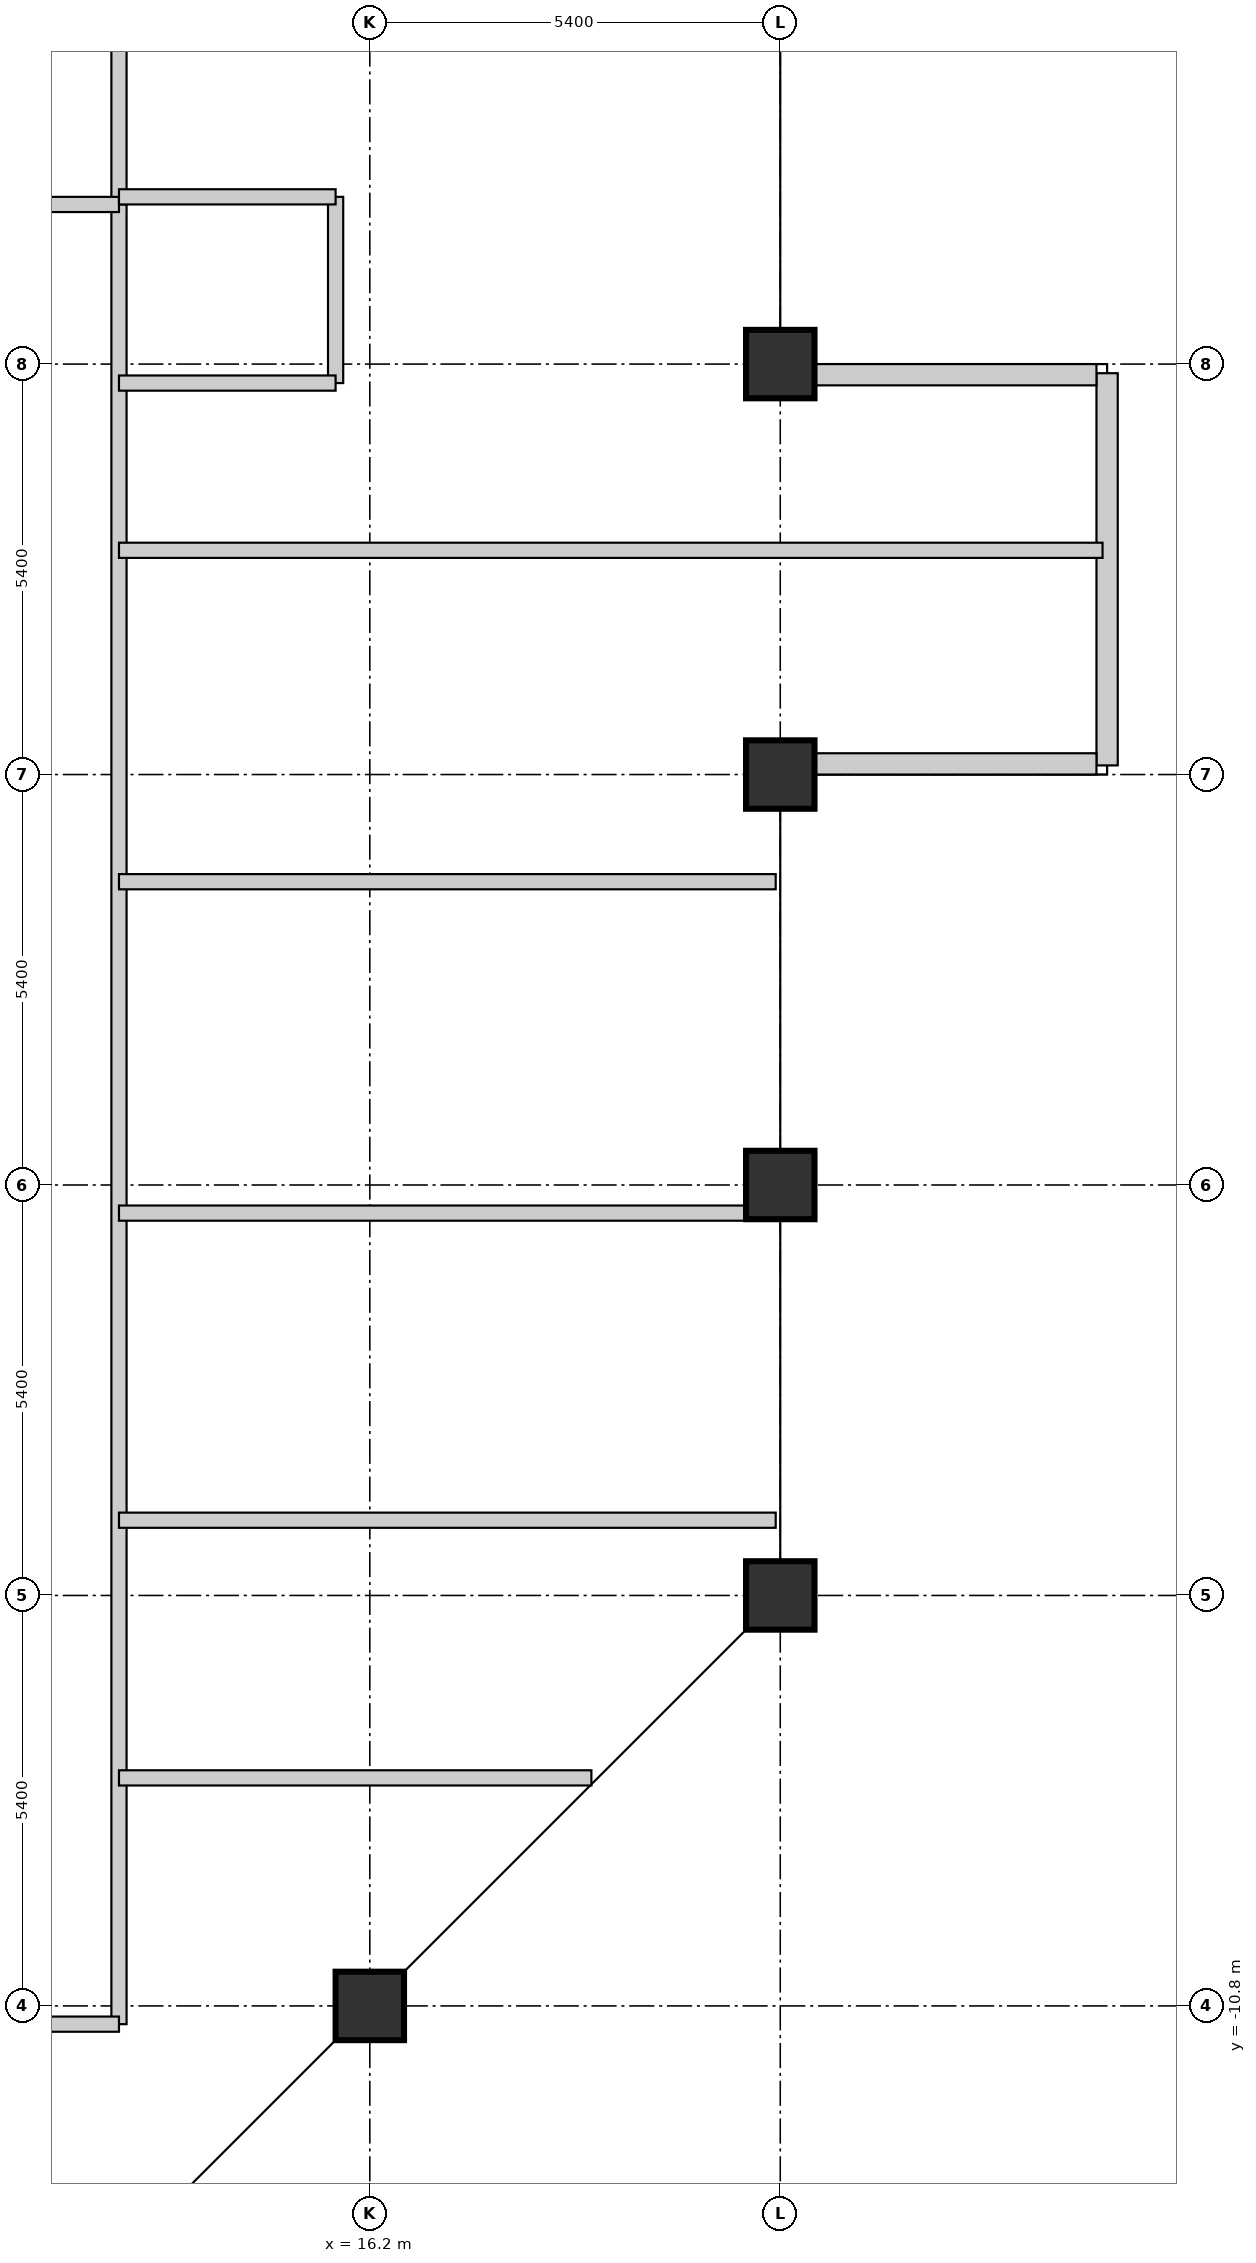
"""IFC4 building model, lengths in metres.
Left out: names, types, materials, properties, quantities, classifications, styles, units other than length and angle.
Written with IfcOpenShell. Run it as: python <this file> out.ifc"""

import sys

from ifc_helpers import new_model, si_unit, direction, frame, frame_2d, origin, origin_2d, place, context, subcontext, project, spatial, rectangle, extrude, element, fill, save


model = new_model("IFC4")
c1 = context("Model", 3, precision=1e-05, world=origin(), true_north=direction((0.0, 1.0)))
c2 = subcontext(c1, "Body", "Model", "MODEL_VIEW")
j1 = project(units=[si_unit("LENGTHUNIT", "METRE"), si_unit("PLANEANGLEUNIT", "RADIAN")], contexts=[c1])
p1 = place(None, origin())
s1 = spatial("IfcSite", under=j1, at=p1, CompositionType="ELEMENT")
p2 = place(p1, origin())
s2 = spatial("IfcBuilding", under=s1, at=p2, CompositionType="ELEMENT")
p3 = place(p2, frame((0.0, 0.0, 174.75)))
s3 = spatial("IfcBuildingStorey", under=s2, at=p3, CompositionType="ELEMENT", Elevation=174.75)
for number, where, z_axis, x_axis in (
    (1, (16.2, -10.8, 0.0), (0.0, 0.0, 1.0), (1.0, 0.0, 0.0)),
    (2, (21.6, -5.4, 0.0), (0.0, 0.0, 1.0), (1.0, 0.0, 0.0)),
    (3, (21.6, 0.0, 0.0), (0.0, 0.0, 1.0), (1.0, 0.0, 0.0)),
    (4, (21.6, 5.4, 0.0), (0.0, 0.0, 1.0), (1.0, 0.0, 0.0)),
    (5, (21.6, 10.8, 0.0), (0.0, 0.0, 1.0), (1.0, 0.0, 0.0)),
):
    element("IfcColumn", number, at=place(p3, frame(where, z_axis=z_axis, x_axis=x_axis)), inside=s3, PredefinedType="COLUMN", context=c2, shape_type="SweptSolid", body=[
        extrude(rectangle(XDim=0.9, YDim=0.9, at=origin_2d()), origin(), (0.0, 0.0, 1.0), 3.75),
    ])
p4 = place(p3, frame((25.9, 5.52, 0.0), z_axis=(0.0, 0.0, 1.0), x_axis=(0.0, 1.0, 0.0)))
e6 = element("IfcWall", 6, at=p4, inside=s3, PredefinedType="STANDARD", context=c2, shape_type="SweptSolid", body=[
    extrude(rectangle(XDim=5.16, YDim=0.28, at=frame_2d((2.58, 0.0))), origin(), (0.0, 0.0, 1.0), 2.857),
])
p5 = place(p4, frame((0.755, 0.0, 0.75)))
e7 = element("IfcOpeningElement", 7, at=p5, cuts=e6, PredefinedType="OPENING", context=c2, shape_type="SweptSolid", body=[
    extrude(rectangle(XDim=1.5, YDim=1.5, at=frame_2d((0.75, 0.75))), frame((0.0, 0.15, 0.0), z_axis=(0.0, -1.0, 0.0), x_axis=(1.0, 0.0, 0.0)), (0.0, 0.0, 1.0), 0.3),
])
p6 = place(p3, frame((22.054, 5.54, 0.0), z_axis=(0.0, 0.0, 1.0), x_axis=(1.0, 0.0, 0.0)))
e8 = element("IfcWall", 8, at=p6, inside=s3, PredefinedType="STANDARD", context=c2, shape_type="SweptSolid", body=[
    extrude(rectangle(XDim=3.706, YDim=0.28, at=frame_2d((1.853, 0.0))), origin(), (0.0, 0.0, 1.0), 2.857),
])
p7 = place(p6, frame((1.328, 0.0, 0.75)))
e9 = element("IfcOpeningElement", 9, at=p7, cuts=e8, PredefinedType="OPENING", context=c2, shape_type="SweptSolid", body=[
    extrude(rectangle(XDim=1.05, YDim=1.5, at=frame_2d((0.525, 0.75))), frame((0.0, 0.15, 0.0), z_axis=(0.0, -1.0, 0.0), x_axis=(1.0, 0.0, 0.0)), (0.0, 0.0, 1.0), 0.3),
])
p8 = place(p3, frame((22.054, 10.66, 0.0), z_axis=(0.0, 0.0, 1.0), x_axis=(1.0, 0.0, 0.0)))
e10 = element("IfcWall", 10, at=p8, inside=s3, PredefinedType="STANDARD", context=c2, shape_type="SweptSolid", body=[
    extrude(rectangle(XDim=3.706, YDim=0.28, at=frame_2d((1.853, 0.0))), origin(), (0.0, 0.0, 1.0), 2.857),
])
p9 = place(p8, frame((1.328, 0.0, 0.75)))
e11 = element("IfcOpeningElement", 11, at=p9, cuts=e10, PredefinedType="OPENING", context=c2, shape_type="SweptSolid", body=[
    extrude(rectangle(XDim=1.05, YDim=1.5, at=frame_2d((0.525, 0.75))), frame((0.0, 0.15, 0.0), z_axis=(0.0, -1.0, 0.0), x_axis=(1.0, 0.0, 0.0)), (0.0, 0.0, 1.0), 0.3),
])
p10 = place(p3, frame((12.9, 12.9, 0.0), z_axis=(0.0, 0.0, 1.0), x_axis=(0.0, 1.0, 0.0)))
e12 = element("IfcWall", 12, at=p10, inside=s3, PredefinedType="PARTITIONING", context=c2, shape_type="SweptSolid", body=[
    extrude(rectangle(XDim=12.94, YDim=0.2, at=frame_2d((6.47, 0.0))), origin(), (0.0, 0.0, 1.0), 2.78),
])
p11 = place(p3, frame((12.9, -11.04, 0.0), z_axis=(0.0, 0.0, 1.0), x_axis=(0.0, 1.0, 0.0)))
e13 = element("IfcWall", 13, at=p11, inside=s3, PredefinedType="PARTITIONING", context=c2, shape_type="SweptSolid", body=[
    extrude(rectangle(XDim=23.94, YDim=0.2, at=frame_2d((11.97, 0.0))), origin(), (0.0, 0.0, 1.0), 3.006),
])
p12 = place(p11, frame((1.14, 0.0, 0.0)))
e14 = element("IfcOpeningElement", 14, at=p12, cuts=e13, PredefinedType="OPENING", context=c2, shape_type="SweptSolid", body=[
    extrude(rectangle(XDim=0.95, YDim=2.1, at=frame_2d((0.475, 1.05))), frame((0.0, 0.11, 0.0), z_axis=(0.0, -1.0, 0.0), x_axis=(1.0, 0.0, 0.0)), (0.0, 0.0, 1.0), 0.22),
])
p13 = place(p11, frame((22.345, 0.0, 0.0)))
e15 = element("IfcOpeningElement", 15, at=p13, cuts=e13, PredefinedType="OPENING", context=c2, shape_type="SweptSolid", body=[
    extrude(rectangle(XDim=0.85, YDim=2.1, at=frame_2d((0.425, 1.05))), frame((0.0, 0.11, 0.0), z_axis=(0.0, -1.0, 0.0), x_axis=(1.0, 0.0, 0.0)), (0.0, 0.0, 1.0), 0.22),
])
p14 = place(p11, frame((20.01, 0.0, 0.0)))
e16 = element("IfcOpeningElement", 16, at=p14, cuts=e13, PredefinedType="OPENING", context=c2, shape_type="SweptSolid", body=[
    extrude(rectangle(XDim=0.95, YDim=2.1, at=frame_2d((0.475, 1.05))), frame((0.0, 0.11, 0.0), z_axis=(0.0, -1.0, 0.0), x_axis=(1.0, 0.0, 0.0)), (0.0, 0.0, 1.0), 0.22),
])
p15 = place(p11, frame((4.455, 0.0, 0.0)))
e17 = element("IfcOpeningElement", 17, at=p15, cuts=e13, PredefinedType="OPENING", context=c2, shape_type="SweptSolid", body=[
    extrude(rectangle(XDim=0.95, YDim=2.1, at=frame_2d((0.475, 1.05))), frame((0.0, 0.11, 0.0), z_axis=(0.0, -1.0, 0.0), x_axis=(1.0, 0.0, 0.0)), (0.0, 0.0, 1.0), 0.22),
])
p16 = place(p11, frame((8.17, 0.0, 0.0)))
e18 = element("IfcOpeningElement", 18, at=p16, cuts=e13, PredefinedType="OPENING", context=c2, shape_type="SweptSolid", body=[
    extrude(rectangle(XDim=0.95, YDim=2.1, at=frame_2d((0.475, 1.05))), frame((0.0, 0.11, 0.0), z_axis=(0.0, -1.0, 0.0), x_axis=(1.0, 0.0, 0.0)), (0.0, 0.0, 1.0), 0.22),
])
p17 = place(p11, frame((12.37, 0.0, 0.0)))
e19 = element("IfcOpeningElement", 19, at=p17, cuts=e13, PredefinedType="OPENING", context=c2, shape_type="SweptSolid", body=[
    extrude(rectangle(XDim=0.95, YDim=2.1, at=frame_2d((0.475, 1.05))), frame((0.0, 0.11, 0.0), z_axis=(0.0, -1.0, 0.0), x_axis=(1.0, 0.0, 0.0)), (0.0, 0.0, 1.0), 0.22),
])
p18 = place(p11, frame((16.73, 0.0, 0.0)))
e20 = element("IfcOpeningElement", 20, at=p18, cuts=e13, PredefinedType="OPENING", context=c2, shape_type="SweptSolid", body=[
    extrude(rectangle(XDim=0.95, YDim=2.1, at=frame_2d((0.475, 1.05))), frame((0.0, 0.11, 0.0), z_axis=(0.0, -1.0, 0.0), x_axis=(1.0, 0.0, 0.0)), (0.0, 0.0, 1.0), 0.22),
])
p19 = place(p3, frame((11.04, -11.04, 0.0), z_axis=(0.0, 0.0, 1.0), x_axis=(1.0, 0.0, 0.0)))
e21 = element("IfcWall", 21, at=p19, inside=s3, PredefinedType="PARTITIONING", context=c2, shape_type="SweptSolid", body=[
    extrude(rectangle(XDim=1.86, YDim=0.2, at=frame_2d((0.93, 0.0))), origin(), (0.0, 0.0, 1.0), 3.006),
])
p20 = place(p3, frame((-0.75, 12.9, 0.0), z_axis=(0.0, 0.0, 1.0), x_axis=(1.0, 0.0, 0.0)))
e22 = element("IfcWall", 22, at=p20, inside=s3, PredefinedType="PARTITIONING", context=c2, shape_type="SweptSolid", body=[
    extrude(rectangle(XDim=13.65, YDim=0.2, at=frame_2d((6.825, 0.0))), origin(), (0.0, 0.0, 1.0), 3.006),
])
p21 = place(p20, frame((2.69, 0.0, 0.0)))
e23 = element("IfcOpeningElement", 23, at=p21, cuts=e22, PredefinedType="OPENING", context=c2, shape_type="SweptSolid", body=[
    extrude(rectangle(XDim=0.95, YDim=2.1, at=frame_2d((0.475, 1.05))), frame((0.0, 0.11, 0.0), z_axis=(0.0, -1.0, 0.0), x_axis=(1.0, 0.0, 0.0)), (0.0, 0.0, 1.0), 0.22),
])
p22 = place(p20, frame((8.015, 0.0, 0.0)))
e24 = element("IfcOpeningElement", 24, at=p22, cuts=e22, PredefinedType="OPENING", context=c2, shape_type="SweptSolid", body=[
    extrude(rectangle(XDim=0.85, YDim=2.1, at=frame_2d((0.425, 1.05))), frame((0.0, 0.11, 0.0), z_axis=(0.0, -1.0, 0.0), x_axis=(1.0, 0.0, 0.0)), (0.0, 0.0, 1.0), 0.22),
])
p23 = place(p20, frame((11.7, 0.0, 0.0)))
e25 = element("IfcOpeningElement", 25, at=p23, cuts=e22, PredefinedType="OPENING", context=c2, shape_type="SweptSolid", body=[
    extrude(rectangle(XDim=0.85, YDim=2.1, at=frame_2d((0.425, 1.05))), frame((0.0, 0.11, 0.0), z_axis=(0.0, -1.0, 0.0), x_axis=(1.0, 0.0, 0.0)), (0.0, 0.0, 1.0), 0.22),
])
for number, where, z_axis, x_axis in (
    (26, (12.9, -4.41, 0.0), (0.0, 0.0, 1.0), (1.0, 0.0, 0.0)),
    (27, (12.9, -0.37, 0.0), (0.0, 0.0, 1.0), (1.0, 0.0, 0.0)),
    (28, (12.9, 3.99, 0.0), (0.0, 0.0, 1.0), (1.0, 0.0, 0.0)),
):
    element("IfcWall", number, at=place(p3, frame(where, z_axis=z_axis, x_axis=x_axis)), inside=s3, PredefinedType="PARTITIONING", context=c2, shape_type="SweptSolid", body=[
        extrude(rectangle(XDim=8.64, YDim=0.2, at=frame_2d((4.32, 0.0))), origin(), (0.0, 0.0, 1.0), 2.78),
    ])
p24 = place(p3, frame((15.75, 10.55, 0.0), z_axis=(0.0, 0.0, 1.0), x_axis=(0.0, 1.0, 0.0)))
e29 = element("IfcWall", 29, at=p24, inside=s3, PredefinedType="PARTITIONING", context=c2, shape_type="SweptSolid", body=[
    extrude(rectangle(XDim=2.45, YDim=0.2, at=frame_2d((1.225, 0.0))), origin(), (0.0, 0.0, 1.0), 3.006),
])
p25 = place(p3, frame((12.9, 13.0, 0.0), z_axis=(0.0, 0.0, 1.0), x_axis=(1.0, 0.0, 0.0)))
e30 = element("IfcWall", 30, at=p25, inside=s3, PredefinedType="PARTITIONING", context=c2, shape_type="SweptSolid", body=[
    extrude(rectangle(XDim=2.85, YDim=0.2, at=frame_2d((1.425, 0.0))), origin(), (0.0, 0.0, 1.0), 3.57),
])
p26 = place(p3, frame((12.9, 10.55, 0.0), z_axis=(0.0, 0.0, 1.0), x_axis=(1.0, 0.0, 0.0)))
e31 = element("IfcWall", 31, at=p26, inside=s3, PredefinedType="PARTITIONING", context=c2, shape_type="SweptSolid", body=[
    extrude(rectangle(XDim=2.85, YDim=0.2, at=frame_2d((1.425, 0.0))), origin(), (0.0, 0.0, 1.0), 3.006),
])
p27 = place(p3, frame((12.9, -7.8, 0.0), z_axis=(0.0, 0.0, 1.0), x_axis=(1.0, 0.0, 0.0)))
e32 = element("IfcWall", 32, at=p27, inside=s3, PredefinedType="PARTITIONING", context=c2, shape_type="SweptSolid", body=[
    extrude(rectangle(XDim=6.215, YDim=0.2, at=frame_2d((3.108, 0.0))), origin(), (0.0, 0.0, 1.0), 2.78),
])
p28 = place(p3, frame((12.9, 8.35, 0.0), z_axis=(0.0, 0.0, 1.0), x_axis=(1.0, 0.0, 0.0)))
e33 = element("IfcWall", 33, at=p28, inside=s3, PredefinedType="PARTITIONING", context=c2, shape_type="SweptSolid", body=[
    extrude(rectangle(XDim=12.94, YDim=0.2, at=frame_2d((6.47, 0.0))), origin(), (0.0, 0.0, 1.0), 2.78),
])
p29 = place(p5, origin())
e34 = element("IfcWindow", 34, at=p29, inside=s3, PartitioningType="SINGLE_PANEL", PredefinedType="WINDOW", context=c2, shape_type="SweptSolid", body=[
    extrude(rectangle(XDim=1.5, YDim=1.5, at=frame_2d((0.75, 0.75))), frame((0.0, 0.03, 0.0), z_axis=(0.0, -1.0, 0.0), x_axis=(1.0, 0.0, 0.0)), (0.0, 0.0, 1.0), 0.06),
])
fill(e7, e34)
p30 = place(p7, origin())
e35 = element("IfcWindow", 35, at=p30, inside=s3, PartitioningType="SINGLE_PANEL", PredefinedType="WINDOW", context=c2, shape_type="SweptSolid", body=[
    extrude(rectangle(XDim=1.05, YDim=1.5, at=frame_2d((0.525, 0.75))), frame((0.0, 0.03, 0.0), z_axis=(0.0, -1.0, 0.0), x_axis=(1.0, 0.0, 0.0)), (0.0, 0.0, 1.0), 0.06),
])
fill(e9, e35)
p31 = place(p9, origin())
e36 = element("IfcWindow", 36, at=p31, inside=s3, PartitioningType="SINGLE_PANEL", PredefinedType="WINDOW", context=c2, shape_type="SweptSolid", body=[
    extrude(rectangle(XDim=1.05, YDim=1.5, at=frame_2d((0.525, 0.75))), frame((0.0, 0.03, 0.0), z_axis=(0.0, -1.0, 0.0), x_axis=(1.0, 0.0, 0.0)), (0.0, 0.0, 1.0), 0.06),
])
fill(e11, e36)
p32 = place(p12, origin())
e37 = element("IfcDoor", 37, at=p32, inside=s3, OperationType="SINGLE_SWING_RIGHT", PredefinedType="DOOR", context=c2, shape_type="SweptSolid", body=[
    extrude(rectangle(XDim=0.95, YDim=2.1, at=frame_2d((0.475, 1.05))), frame((0.0, 0.025, 0.0), z_axis=(0.0, -1.0, 0.0), x_axis=(1.0, 0.0, 0.0)), (0.0, 0.0, 1.0), 0.05),
])
fill(e14, e37)
p33 = place(p13, origin())
e38 = element("IfcDoor", 38, at=p33, inside=s3, OperationType="SINGLE_SWING_LEFT", PredefinedType="DOOR", context=c2, shape_type="SweptSolid", body=[
    extrude(rectangle(XDim=0.85, YDim=2.1, at=frame_2d((0.425, 1.05))), frame((0.0, 0.025, 0.0), z_axis=(0.0, -1.0, 0.0), x_axis=(1.0, 0.0, 0.0)), (0.0, 0.0, 1.0), 0.05),
])
fill(e15, e38)
p34 = place(p14, origin())
e39 = element("IfcDoor", 39, at=p34, inside=s3, OperationType="SINGLE_SWING_RIGHT", PredefinedType="DOOR", context=c2, shape_type="SweptSolid", body=[
    extrude(rectangle(XDim=0.95, YDim=2.1, at=frame_2d((0.475, 1.05))), frame((0.0, 0.025, 0.0), z_axis=(0.0, -1.0, 0.0), x_axis=(1.0, 0.0, 0.0)), (0.0, 0.0, 1.0), 0.05),
])
fill(e16, e39)
p35 = place(p15, origin())
e40 = element("IfcDoor", 40, at=p35, inside=s3, OperationType="SINGLE_SWING_LEFT", PredefinedType="DOOR", context=c2, shape_type="SweptSolid", body=[
    extrude(rectangle(XDim=0.95, YDim=2.1, at=frame_2d((0.475, 1.05))), frame((0.0, 0.025, 0.0), z_axis=(0.0, -1.0, 0.0), x_axis=(1.0, 0.0, 0.0)), (0.0, 0.0, 1.0), 0.05),
])
fill(e17, e40)
p36 = place(p16, origin())
e41 = element("IfcDoor", 41, at=p36, inside=s3, OperationType="SINGLE_SWING_RIGHT", PredefinedType="DOOR", context=c2, shape_type="SweptSolid", body=[
    extrude(rectangle(XDim=0.95, YDim=2.1, at=frame_2d((0.475, 1.05))), frame((0.0, 0.025, 0.0), z_axis=(0.0, -1.0, 0.0), x_axis=(1.0, 0.0, 0.0)), (0.0, 0.0, 1.0), 0.05),
])
fill(e18, e41)
p37 = place(p17, origin())
e42 = element("IfcDoor", 42, at=p37, inside=s3, OperationType="SINGLE_SWING_LEFT", PredefinedType="DOOR", context=c2, shape_type="SweptSolid", body=[
    extrude(rectangle(XDim=0.95, YDim=2.1, at=frame_2d((0.475, 1.05))), frame((0.0, 0.025, 0.0), z_axis=(0.0, -1.0, 0.0), x_axis=(1.0, 0.0, 0.0)), (0.0, 0.0, 1.0), 0.05),
])
fill(e19, e42)
p38 = place(p18, origin())
e43 = element("IfcDoor", 43, at=p38, inside=s3, OperationType="SINGLE_SWING_RIGHT", PredefinedType="DOOR", context=c2, shape_type="SweptSolid", body=[
    extrude(rectangle(XDim=0.95, YDim=2.1, at=frame_2d((0.475, 1.05))), frame((0.0, 0.025, 0.0), z_axis=(0.0, -1.0, 0.0), x_axis=(1.0, 0.0, 0.0)), (0.0, 0.0, 1.0), 0.05),
])
fill(e20, e43)
save(model, sys.argv[1])
